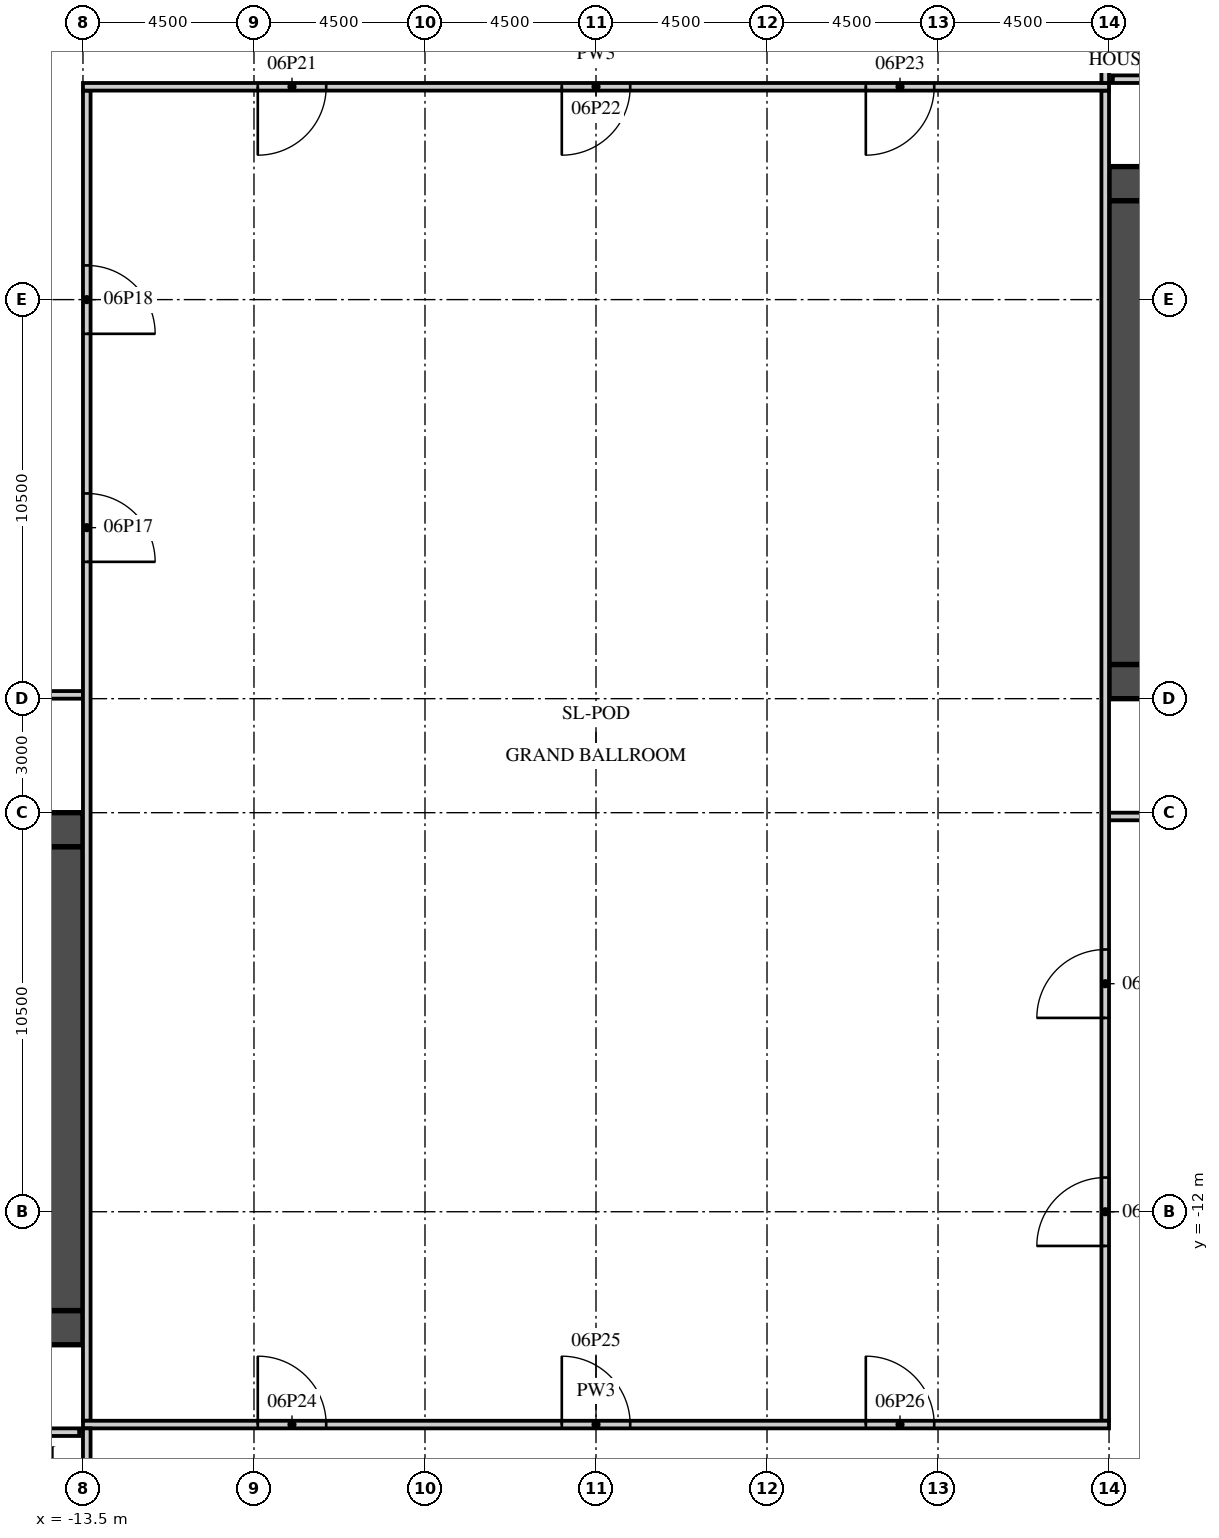
"""IFC4 building model, lengths in metres.
Left out: names, types, materials, properties, quantities, classifications, styles, units other than length and angle.
Written with IfcOpenShell. Run it as: python <this file> out.ifc"""

import sys

from ifc_helpers import new_model, si_unit, direction, frame, frame_2d, origin, place, context, subcontext, project, spatial, rectangle, extrude, element, fill, save


model = new_model("IFC4")
c1 = context("Model", 3, precision=1e-05, world=origin(), true_north=direction((0.0, 1.0)))
c2 = subcontext(c1, "Body", "Model", "MODEL_VIEW")
j1 = project(units=[si_unit("LENGTHUNIT", "METRE"), si_unit("PLANEANGLEUNIT", "RADIAN")], contexts=[c1])
p1 = place(None, origin())
s1 = spatial("IfcSite", under=j1, at=p1, CompositionType="ELEMENT")
p2 = place(p1, origin())
s2 = spatial("IfcBuilding", under=s1, at=p2, CompositionType="ELEMENT")
p3 = place(p2, frame((0.0, 0.0, 38.0)))
s3 = spatial("IfcBuildingStorey", under=s2, at=p3, CompositionType="ELEMENT", Elevation=38.0)
p4 = place(p3, frame((-31.5, -1.95, 0.0), z_axis=(0.0, 0.0, 1.0), x_axis=(1.0, 0.0, 0.0)))
e1 = element("IfcWall", 1, at=p4, inside=s3, PredefinedType="SHEAR", context=c2, shape_type="SweptSolid", body=[
    extrude(rectangle(XDim=18.0, YDim=0.9, at=frame_2d((9.0, 0.0))), origin(), (0.0, 0.0, 1.0), 8.7),
])
p5 = place(p4, frame((14.725, 0.0, 0.0)))
e2 = element("IfcOpeningElement", 2, at=p5, cuts=e1, PredefinedType="OPENING", context=c2, shape_type="SweptSolid", body=[
    extrude(rectangle(XDim=1.8, YDim=2.1, at=frame_2d((0.9, 1.05))), frame((0.0, 0.46, 0.0), z_axis=(0.0, -1.0, 0.0), x_axis=(1.0, 0.0, 0.0)), (0.0, 0.0, 1.0), 0.92),
])
p6 = place(p3, frame((-20.3, -15.05, 0.0), z_axis=(0.0, 0.0, 1.0), x_axis=(1.0, 0.0, 0.0)))
e3 = element("IfcWall", 3, at=p6, inside=s3, PredefinedType="SHEAR", context=c2, shape_type="SweptSolid", body=[
    extrude(rectangle(XDim=6.8, YDim=0.9, at=frame_2d((3.4, 0.0))), origin(), (0.0, 0.0, 1.0), 8.7),
])
p7 = place(p6, frame((0.875, 0.0, 0.0)))
e4 = element("IfcOpeningElement", 4, at=p7, cuts=e3, PredefinedType="OPENING", context=c2, shape_type="SweptSolid", body=[
    extrude(rectangle(XDim=1.2, YDim=2.1, at=frame_2d((0.6, 1.05))), frame((0.0, 0.46, 0.0), z_axis=(0.0, -1.0, 0.0), x_axis=(1.0, 0.0, 0.0)), (0.0, 0.0, 1.0), 0.92),
])
p8 = place(p3, frame((-13.95, -14.6, 0.0), z_axis=(0.0, 0.0, 1.0), x_axis=(0.0, 1.0, 0.0)))
e5 = element("IfcWall", 5, at=p8, inside=s3, PredefinedType="SHEAR", context=c2, shape_type="SweptSolid", body=[
    extrude(rectangle(XDim=12.2, YDim=0.9, at=frame_2d((6.1, 0.0))), origin(), (0.0, 0.0, 1.0), 8.7),
])
p9 = place(p3, frame((-44.55, -17.8, 0.0), z_axis=(0.0, 0.0, 1.0), x_axis=(1.0, 0.0, 0.0)))
e6 = element("IfcWall", 6, at=p9, inside=s3, PredefinedType="PARTITIONING", context=c2, shape_type="SweptSolid", body=[
    extrude(rectangle(XDim=30.95, YDim=0.2, at=frame_2d((15.475, 0.0))), origin(), (0.0, 0.0, 1.0), 8.7),
])
p10 = place(p9, frame((13.438, 0.0, 0.0)))
e7 = element("IfcOpeningElement", 7, at=p10, cuts=e6, PredefinedType="OPENING", context=c2, shape_type="SweptSolid", body=[
    extrude(rectangle(XDim=0.9, YDim=2.1, at=frame_2d((0.45, 1.05))), frame((0.0, 0.11, 0.0), z_axis=(0.0, -1.0, 0.0), x_axis=(1.0, 0.0, 0.0)), (0.0, 0.0, 1.0), 0.22),
])
p11 = place(p9, frame((21.738, 0.0, 0.0)))
e8 = element("IfcOpeningElement", 8, at=p11, cuts=e6, PredefinedType="OPENING", context=c2, shape_type="SweptSolid", body=[
    extrude(rectangle(XDim=0.9, YDim=2.1, at=frame_2d((0.45, 1.05))), frame((0.0, 0.11, 0.0), z_axis=(0.0, -1.0, 0.0), x_axis=(1.0, 0.0, 0.0)), (0.0, 0.0, 1.0), 0.22),
])
p12 = place(p3, frame((13.5, 1.95, 0.0), z_axis=(0.0, 0.0, 1.0), x_axis=(1.0, 0.0, 0.0)))
e9 = element("IfcWall", 9, at=p12, inside=s3, PredefinedType="SHEAR", context=c2, shape_type="SweptSolid", body=[
    extrude(rectangle(XDim=18.0, YDim=0.9, at=frame_2d((9.0, 0.0))), origin(), (0.0, 0.0, 1.0), 8.7),
])
p13 = place(p12, frame((1.475, 0.0, 0.0)))
e10 = element("IfcOpeningElement", 10, at=p13, cuts=e9, PredefinedType="OPENING", context=c2, shape_type="SweptSolid", body=[
    extrude(rectangle(XDim=1.8, YDim=2.1, at=frame_2d((0.9, 1.05))), frame((0.0, 0.46, 0.0), z_axis=(0.0, -1.0, 0.0), x_axis=(1.0, 0.0, 0.0)), (0.0, 0.0, 1.0), 0.92),
])
p14 = place(p3, frame((13.5, 15.05, 0.0), z_axis=(0.0, 0.0, 1.0), x_axis=(1.0, 0.0, 0.0)))
e11 = element("IfcWall", 11, at=p14, inside=s3, PredefinedType="SHEAR", context=c2, shape_type="SweptSolid", body=[
    extrude(rectangle(XDim=6.8, YDim=0.9, at=frame_2d((3.4, 0.0))), origin(), (0.0, 0.0, 1.0), 8.7),
])
p15 = place(p14, frame((4.725, 0.0, 0.0)))
e12 = element("IfcOpeningElement", 12, at=p15, cuts=e11, PredefinedType="OPENING", context=c2, shape_type="SweptSolid", body=[
    extrude(rectangle(XDim=1.2, YDim=2.1, at=frame_2d((0.6, 1.05))), frame((0.0, 0.46, 0.0), z_axis=(0.0, -1.0, 0.0), x_axis=(1.0, 0.0, 0.0)), (0.0, 0.0, 1.0), 0.92),
])
p16 = place(p3, frame((13.95, 2.4, 0.0), z_axis=(0.0, 0.0, 1.0), x_axis=(0.0, 1.0, 0.0)))
e13 = element("IfcWall", 13, at=p16, inside=s3, PredefinedType="SHEAR", context=c2, shape_type="SweptSolid", body=[
    extrude(rectangle(XDim=12.2, YDim=0.9, at=frame_2d((6.1, 0.0))), origin(), (0.0, 0.0, 1.0), 8.7),
])
p17 = place(p3, frame((13.6, 17.8, 0.0), z_axis=(0.0, 0.0, 1.0), x_axis=(1.0, 0.0, 0.0)))
e14 = element("IfcWall", 14, at=p17, inside=s3, PredefinedType="PARTITIONING", context=c2, shape_type="SweptSolid", body=[
    extrude(rectangle(XDim=30.95, YDim=0.2, at=frame_2d((15.475, 0.0))), origin(), (0.0, 0.0, 1.0), 8.7),
])
p18 = place(p17, frame((17.812, 0.0, 0.0)))
e15 = element("IfcOpeningElement", 15, at=p18, cuts=e14, PredefinedType="OPENING", context=c2, shape_type="SweptSolid", body=[
    extrude(rectangle(XDim=0.9, YDim=2.1, at=frame_2d((0.45, 1.05))), frame((0.0, 0.11, 0.0), z_axis=(0.0, -1.0, 0.0), x_axis=(1.0, 0.0, 0.0)), (0.0, 0.0, 1.0), 0.22),
])
p19 = place(p17, frame((9.512, 0.0, 0.0)))
e16 = element("IfcOpeningElement", 16, at=p19, cuts=e14, PredefinedType="OPENING", context=c2, shape_type="SweptSolid", body=[
    extrude(rectangle(XDim=0.9, YDim=2.1, at=frame_2d((0.45, 1.05))), frame((0.0, 0.11, 0.0), z_axis=(0.0, -1.0, 0.0), x_axis=(1.0, 0.0, 0.0)), (0.0, 0.0, 1.0), 0.22),
])
p20 = place(p3, frame((-39.4, 1.6, 0.0), z_axis=(0.0, 0.0, 1.0), x_axis=(1.0, 0.0, 0.0)))
e17 = element("IfcWall", 17, at=p20, inside=s3, PredefinedType="PARTITIONING", context=c2, shape_type="SweptSolid", body=[
    extrude(rectangle(XDim=25.9, YDim=0.2, at=frame_2d((12.95, 0.0))), origin(), (0.0, 0.0, 1.0), 8.7),
])
p21 = place(p20, frame((20.55, 0.0, 0.0)))
e18 = element("IfcOpeningElement", 18, at=p21, cuts=e17, PredefinedType="OPENING", context=c2, shape_type="SweptSolid", body=[
    extrude(rectangle(XDim=1.8, YDim=2.1, at=frame_2d((0.9, 1.05))), frame((0.0, 0.11, 0.0), z_axis=(0.0, -1.0, 0.0), x_axis=(1.0, 0.0, 0.0)), (0.0, 0.0, 1.0), 0.22),
])
p22 = place(p20, frame((14.375, 0.0, 0.0)))
e19 = element("IfcOpeningElement", 19, at=p22, cuts=e17, PredefinedType="OPENING", context=c2, shape_type="SweptSolid", body=[
    extrude(rectangle(XDim=1.2, YDim=2.1, at=frame_2d((0.6, 1.05))), frame((0.0, 0.11, 0.0), z_axis=(0.0, -1.0, 0.0), x_axis=(1.0, 0.0, 0.0)), (0.0, 0.0, 1.0), 0.22),
])
p23 = place(p20, frame((3.1, 0.0, 0.0)))
e20 = element("IfcOpeningElement", 20, at=p23, cuts=e17, PredefinedType="OPENING", context=c2, shape_type="SweptSolid", body=[
    extrude(rectangle(XDim=1.8, YDim=2.1, at=frame_2d((0.9, 1.05))), frame((0.0, 0.11, 0.0), z_axis=(0.0, -1.0, 0.0), x_axis=(1.0, 0.0, 0.0)), (0.0, 0.0, 1.0), 0.22),
])
p24 = place(p3, frame((13.5, -1.6, 0.0), z_axis=(0.0, 0.0, 1.0), x_axis=(1.0, 0.0, 0.0)))
e21 = element("IfcWall", 21, at=p24, inside=s3, PredefinedType="PARTITIONING", context=c2, shape_type="SweptSolid", body=[
    extrude(rectangle(XDim=25.9, YDim=0.2, at=frame_2d((12.95, 0.0))), origin(), (0.0, 0.0, 1.0), 8.7),
])
p25 = place(p24, frame((3.55, 0.0, 0.0)))
e22 = element("IfcOpeningElement", 22, at=p25, cuts=e21, PredefinedType="OPENING", context=c2, shape_type="SweptSolid", body=[
    extrude(rectangle(XDim=1.8, YDim=2.1, at=frame_2d((0.9, 1.05))), frame((0.0, 0.11, 0.0), z_axis=(0.0, -1.0, 0.0), x_axis=(1.0, 0.0, 0.0)), (0.0, 0.0, 1.0), 0.22),
])
p26 = place(p24, frame((10.325, 0.0, 0.0)))
e23 = element("IfcOpeningElement", 23, at=p26, cuts=e21, PredefinedType="OPENING", context=c2, shape_type="SweptSolid", body=[
    extrude(rectangle(XDim=1.2, YDim=2.1, at=frame_2d((0.6, 1.05))), frame((0.0, 0.11, 0.0), z_axis=(0.0, -1.0, 0.0), x_axis=(1.0, 0.0, 0.0)), (0.0, 0.0, 1.0), 0.22),
])
p27 = place(p24, frame((21.4, 0.0, 0.0)))
e24 = element("IfcOpeningElement", 24, at=p27, cuts=e21, PredefinedType="OPENING", context=c2, shape_type="SweptSolid", body=[
    extrude(rectangle(XDim=1.0, YDim=2.1, at=frame_2d((0.5, 1.05))), frame((0.0, 0.11, 0.0), z_axis=(0.0, -1.0, 0.0), x_axis=(1.0, 0.0, 0.0)), (0.0, 0.0, 1.0), 0.22),
])
p28 = place(p3, frame((-13.4, -17.5, 0.0), z_axis=(0.0, 0.0, 1.0), x_axis=(0.0, 1.0, 0.0)))
e25 = element("IfcWall", 25, at=p28, inside=s3, PredefinedType="PARTITIONING", context=c2, shape_type="SweptSolid", body=[
    extrude(rectangle(XDim=35.0, YDim=0.2, at=frame_2d((17.5, 0.0))), origin(), (0.0, 0.0, 1.0), 8.7),
])
p29 = place(p28, frame((22.6, 0.0, 0.0)))
e26 = element("IfcOpeningElement", 26, at=p29, cuts=e25, PredefinedType="OPENING", context=c2, shape_type="SweptSolid", body=[
    extrude(rectangle(XDim=1.8, YDim=2.1, at=frame_2d((0.9, 1.05))), frame((0.0, 0.11, 0.0), z_axis=(0.0, -1.0, 0.0), x_axis=(1.0, 0.0, 0.0)), (0.0, 0.0, 1.0), 0.22),
])
p30 = place(p28, frame((28.6, 0.0, 0.0)))
e27 = element("IfcOpeningElement", 27, at=p30, cuts=e25, PredefinedType="OPENING", context=c2, shape_type="SweptSolid", body=[
    extrude(rectangle(XDim=1.8, YDim=2.1, at=frame_2d((0.9, 1.05))), frame((0.0, 0.11, 0.0), z_axis=(0.0, -1.0, 0.0), x_axis=(1.0, 0.0, 0.0)), (0.0, 0.0, 1.0), 0.22),
])
p31 = place(p3, frame((13.4, -17.5, 0.0), z_axis=(0.0, 0.0, 1.0), x_axis=(0.0, 1.0, 0.0)))
e28 = element("IfcWall", 28, at=p31, inside=s3, PredefinedType="PARTITIONING", context=c2, shape_type="SweptSolid", body=[
    extrude(rectangle(XDim=35.0, YDim=0.2, at=frame_2d((17.5, 0.0))), origin(), (0.0, 0.0, 1.0), 8.7),
])
p32 = place(p31, frame((10.6, 0.0, 0.0)))
e29 = element("IfcOpeningElement", 29, at=p32, cuts=e28, PredefinedType="OPENING", context=c2, shape_type="SweptSolid", body=[
    extrude(rectangle(XDim=1.8, YDim=2.1, at=frame_2d((0.9, 1.05))), frame((0.0, 0.11, 0.0), z_axis=(0.0, -1.0, 0.0), x_axis=(1.0, 0.0, 0.0)), (0.0, 0.0, 1.0), 0.22),
])
p33 = place(p31, frame((4.6, 0.0, 0.0)))
e30 = element("IfcOpeningElement", 30, at=p33, cuts=e28, PredefinedType="OPENING", context=c2, shape_type="SweptSolid", body=[
    extrude(rectangle(XDim=1.8, YDim=2.1, at=frame_2d((0.9, 1.05))), frame((0.0, 0.11, 0.0), z_axis=(0.0, -1.0, 0.0), x_axis=(1.0, 0.0, 0.0)), (0.0, 0.0, 1.0), 0.22),
])
p34 = place(p3, frame((-13.5, 17.6, 0.0), z_axis=(0.0, 0.0, 1.0), x_axis=(1.0, 0.0, 0.0)))
e31 = element("IfcWall", 31, at=p34, inside=s3, PredefinedType="PARTITIONING", context=c2, shape_type="SweptSolid", body=[
    extrude(rectangle(XDim=27.0, YDim=0.2, at=frame_2d((13.5, 0.0))), origin(), (0.0, 0.0, 1.0), 8.7),
])
p35 = place(p34, frame((4.6, 0.0, 0.0)))
e32 = element("IfcOpeningElement", 32, at=p35, cuts=e31, PredefinedType="OPENING", context=c2, shape_type="SweptSolid", body=[
    extrude(rectangle(XDim=1.8, YDim=2.1, at=frame_2d((0.9, 1.05))), frame((0.0, 0.11, 0.0), z_axis=(0.0, -1.0, 0.0), x_axis=(1.0, 0.0, 0.0)), (0.0, 0.0, 1.0), 0.22),
])
p36 = place(p34, frame((12.6, 0.0, 0.0)))
e33 = element("IfcOpeningElement", 33, at=p36, cuts=e31, PredefinedType="OPENING", context=c2, shape_type="SweptSolid", body=[
    extrude(rectangle(XDim=1.8, YDim=2.1, at=frame_2d((0.9, 1.05))), frame((0.0, 0.11, 0.0), z_axis=(0.0, -1.0, 0.0), x_axis=(1.0, 0.0, 0.0)), (0.0, 0.0, 1.0), 0.22),
])
p37 = place(p34, frame((20.6, 0.0, 0.0)))
e34 = element("IfcOpeningElement", 34, at=p37, cuts=e31, PredefinedType="OPENING", context=c2, shape_type="SweptSolid", body=[
    extrude(rectangle(XDim=1.8, YDim=2.1, at=frame_2d((0.9, 1.05))), frame((0.0, 0.11, 0.0), z_axis=(0.0, -1.0, 0.0), x_axis=(1.0, 0.0, 0.0)), (0.0, 0.0, 1.0), 0.22),
])
p38 = place(p3, frame((-13.5, -17.6, 0.0), z_axis=(0.0, 0.0, 1.0), x_axis=(1.0, 0.0, 0.0)))
e35 = element("IfcWall", 35, at=p38, inside=s3, PredefinedType="PARTITIONING", context=c2, shape_type="SweptSolid", body=[
    extrude(rectangle(XDim=27.0, YDim=0.2, at=frame_2d((13.5, 0.0))), origin(), (0.0, 0.0, 1.0), 8.7),
])
p39 = place(p38, frame((4.6, 0.0, 0.0)))
e36 = element("IfcOpeningElement", 36, at=p39, cuts=e35, PredefinedType="OPENING", context=c2, shape_type="SweptSolid", body=[
    extrude(rectangle(XDim=1.8, YDim=2.1, at=frame_2d((0.9, 1.05))), frame((0.0, 0.11, 0.0), z_axis=(0.0, -1.0, 0.0), x_axis=(1.0, 0.0, 0.0)), (0.0, 0.0, 1.0), 0.22),
])
p40 = place(p38, frame((12.6, 0.0, 0.0)))
e37 = element("IfcOpeningElement", 37, at=p40, cuts=e35, PredefinedType="OPENING", context=c2, shape_type="SweptSolid", body=[
    extrude(rectangle(XDim=1.8, YDim=2.1, at=frame_2d((0.9, 1.05))), frame((0.0, 0.11, 0.0), z_axis=(0.0, -1.0, 0.0), x_axis=(1.0, 0.0, 0.0)), (0.0, 0.0, 1.0), 0.22),
])
p41 = place(p38, frame((20.6, 0.0, 0.0)))
e38 = element("IfcOpeningElement", 38, at=p41, cuts=e35, PredefinedType="OPENING", context=c2, shape_type="SweptSolid", body=[
    extrude(rectangle(XDim=1.8, YDim=2.1, at=frame_2d((0.9, 1.05))), frame((0.0, 0.11, 0.0), z_axis=(0.0, -1.0, 0.0), x_axis=(1.0, 0.0, 0.0)), (0.0, 0.0, 1.0), 0.22),
])
for number, where, z_axis, x_axis in (
    (39, (13.4, 17.7, 0.0), (0.0, 0.0, 1.0), (0.0, 1.0, 0.0)),
    (40, (-13.4, -21.55, 0.0), (0.0, 0.0, 1.0), (0.0, 1.0, 0.0)),
):
    element("IfcWall", number, at=place(p3, frame(where, z_axis=z_axis, x_axis=x_axis)), inside=s3, PredefinedType="PARTITIONING", context=c2, shape_type="SweptSolid", body=[
        extrude(rectangle(XDim=3.85, YDim=0.2, at=frame_2d((1.925, 0.0))), origin(), (0.0, 0.0, 1.0), 8.7),
    ])
p42 = place(p29, origin())
e41 = element("IfcDoor", 41, at=p42, inside=s3, OperationType="DOUBLE_DOOR_DOUBLE_SWING", PredefinedType="DOOR", context=c2, shape_type="SweptSolid", body=[
    extrude(rectangle(XDim=1.8, YDim=2.1, at=frame_2d((0.9, 1.05))), frame((0.0, 0.025, 0.0), z_axis=(0.0, -1.0, 0.0), x_axis=(1.0, 0.0, 0.0)), (0.0, 0.0, 1.0), 0.05),
])
fill(e26, e41)
p43 = place(p30, origin())
e42 = element("IfcDoor", 42, at=p43, inside=s3, OperationType="DOUBLE_DOOR_DOUBLE_SWING", PredefinedType="DOOR", context=c2, shape_type="SweptSolid", body=[
    extrude(rectangle(XDim=1.8, YDim=2.1, at=frame_2d((0.9, 1.05))), frame((0.0, 0.025, 0.0), z_axis=(0.0, -1.0, 0.0), x_axis=(1.0, 0.0, 0.0)), (0.0, 0.0, 1.0), 0.05),
])
fill(e27, e42)
p44 = place(p32, origin())
e43 = element("IfcDoor", 43, at=p44, inside=s3, OperationType="DOUBLE_DOOR_DOUBLE_SWING", PredefinedType="DOOR", context=c2, shape_type="SweptSolid", body=[
    extrude(rectangle(XDim=1.8, YDim=2.1, at=frame_2d((0.9, 1.05))), frame((0.0, 0.025, 0.0), z_axis=(0.0, -1.0, 0.0), x_axis=(1.0, 0.0, 0.0)), (0.0, 0.0, 1.0), 0.05),
])
fill(e29, e43)
p45 = place(p33, origin())
e44 = element("IfcDoor", 44, at=p45, inside=s3, OperationType="DOUBLE_DOOR_DOUBLE_SWING", PredefinedType="DOOR", context=c2, shape_type="SweptSolid", body=[
    extrude(rectangle(XDim=1.8, YDim=2.1, at=frame_2d((0.9, 1.05))), frame((0.0, 0.025, 0.0), z_axis=(0.0, -1.0, 0.0), x_axis=(1.0, 0.0, 0.0)), (0.0, 0.0, 1.0), 0.05),
])
fill(e30, e44)
p46 = place(p35, origin())
e45 = element("IfcDoor", 45, at=p46, inside=s3, OperationType="DOUBLE_DOOR_DOUBLE_SWING", PredefinedType="DOOR", context=c2, shape_type="SweptSolid", body=[
    extrude(rectangle(XDim=1.8, YDim=2.1, at=frame_2d((0.9, 1.05))), frame((0.0, 0.025, 0.0), z_axis=(0.0, -1.0, 0.0), x_axis=(1.0, 0.0, 0.0)), (0.0, 0.0, 1.0), 0.05),
])
fill(e32, e45)
p47 = place(p36, origin())
e46 = element("IfcDoor", 46, at=p47, inside=s3, OperationType="DOUBLE_DOOR_DOUBLE_SWING", PredefinedType="DOOR", context=c2, shape_type="SweptSolid", body=[
    extrude(rectangle(XDim=1.8, YDim=2.1, at=frame_2d((0.9, 1.05))), frame((0.0, 0.025, 0.0), z_axis=(0.0, -1.0, 0.0), x_axis=(1.0, 0.0, 0.0)), (0.0, 0.0, 1.0), 0.05),
])
fill(e33, e46)
p48 = place(p37, origin())
e47 = element("IfcDoor", 47, at=p48, inside=s3, OperationType="DOUBLE_DOOR_DOUBLE_SWING", PredefinedType="DOOR", context=c2, shape_type="SweptSolid", body=[
    extrude(rectangle(XDim=1.8, YDim=2.1, at=frame_2d((0.9, 1.05))), frame((0.0, 0.025, 0.0), z_axis=(0.0, -1.0, 0.0), x_axis=(1.0, 0.0, 0.0)), (0.0, 0.0, 1.0), 0.05),
])
fill(e34, e47)
p49 = place(p39, origin())
e48 = element("IfcDoor", 48, at=p49, inside=s3, OperationType="DOUBLE_DOOR_DOUBLE_SWING", PredefinedType="DOOR", context=c2, shape_type="SweptSolid", body=[
    extrude(rectangle(XDim=1.8, YDim=2.1, at=frame_2d((0.9, 1.05))), frame((0.0, 0.025, 0.0), z_axis=(0.0, -1.0, 0.0), x_axis=(1.0, 0.0, 0.0)), (0.0, 0.0, 1.0), 0.05),
])
fill(e36, e48)
p50 = place(p40, origin())
e49 = element("IfcDoor", 49, at=p50, inside=s3, OperationType="DOUBLE_DOOR_DOUBLE_SWING", PredefinedType="DOOR", context=c2, shape_type="SweptSolid", body=[
    extrude(rectangle(XDim=1.8, YDim=2.1, at=frame_2d((0.9, 1.05))), frame((0.0, 0.025, 0.0), z_axis=(0.0, -1.0, 0.0), x_axis=(1.0, 0.0, 0.0)), (0.0, 0.0, 1.0), 0.05),
])
fill(e37, e49)
p51 = place(p41, origin())
e50 = element("IfcDoor", 50, at=p51, inside=s3, OperationType="DOUBLE_DOOR_DOUBLE_SWING", PredefinedType="DOOR", context=c2, shape_type="SweptSolid", body=[
    extrude(rectangle(XDim=1.8, YDim=2.1, at=frame_2d((0.9, 1.05))), frame((0.0, 0.025, 0.0), z_axis=(0.0, -1.0, 0.0), x_axis=(1.0, 0.0, 0.0)), (0.0, 0.0, 1.0), 0.05),
])
fill(e38, e50)
save(model, sys.argv[1])
